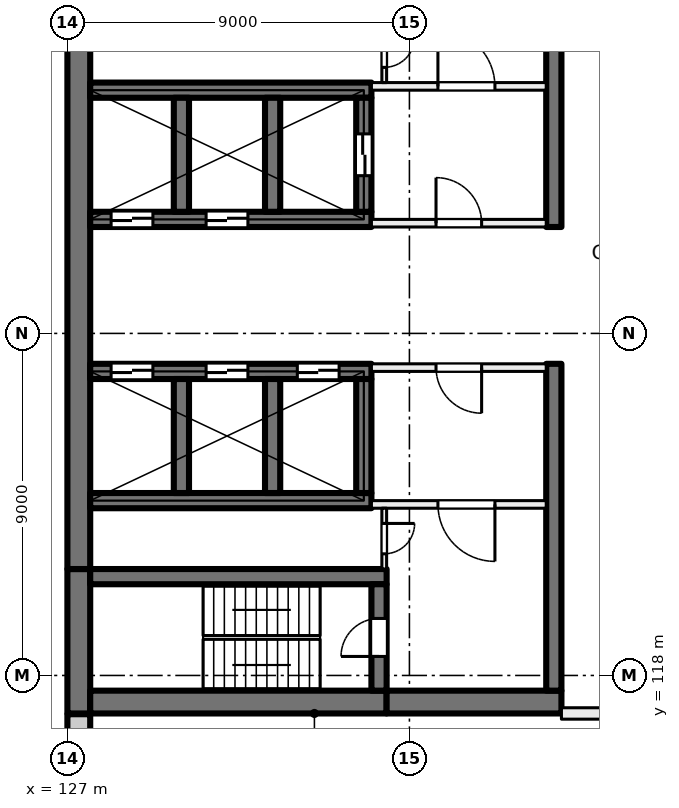
"""IFC4 building model, lengths in metres.
Left out: names, types, materials, properties, quantities, classifications, styles, units other than length and angle.
Written with IfcOpenShell. Run it as: python <this file> out.ifc"""

import sys

from ifc_helpers import new_model, si_unit, direction, frame, frame_2d, origin, place, context, subcontext, project, spatial, rectangle, extrude, element, fill, save


model = new_model("IFC4")
c1 = context("Model", 3, precision=1e-05, world=origin(), true_north=direction((0.0, 1.0)))
c2 = subcontext(c1, "Body", "Model", "MODEL_VIEW")
j1 = project(units=[si_unit("LENGTHUNIT", "METRE"), si_unit("PLANEANGLEUNIT", "RADIAN")], contexts=[c1])
p1 = place(None, origin())
s1 = spatial("IfcSite", under=j1, at=p1, CompositionType="ELEMENT")
p2 = place(p1, origin())
s2 = spatial("IfcBuilding", under=s1, at=p2, CompositionType="ELEMENT")
p3 = place(p2, frame((0.0, 0.0, 105.0)))
s3 = spatial("IfcBuildingStorey", under=s2, at=p3, CompositionType="ELEMENT", Elevation=105.0)
p4 = place(p3, frame((127.3, 117.0, 0.0), z_axis=(0.0, 0.0, 1.0), x_axis=(0.0, 1.0, 0.0)))
e1 = element("IfcWall", 1, at=p4, inside=s3, PredefinedType="SHEAR", context=c2, shape_type="SweptSolid", body=[
    extrude(rectangle(XDim=3.8, YDim=0.6, at=frame_2d((1.9, 0.0))), origin(), (0.0, 0.0, 1.0), 4.0),
])
p5 = place(p3, frame((127.3, 120.8, 0.0), z_axis=(0.0, 0.0, 1.0), x_axis=(0.0, 1.0, 0.0)))
e2 = element("IfcWall", 2, at=p5, inside=s3, PredefinedType="SHEAR", context=c2, shape_type="SweptSolid", body=[
    extrude(rectangle(XDim=14.4, YDim=0.6, at=frame_2d((7.2, 0.0))), origin(), (0.0, 0.0, 1.0), 4.0),
])
p6 = place(p3, frame((127.6, 117.3, 0.0), z_axis=(0.0, 0.0, 1.0), x_axis=(1.0, 0.0, 0.0)))
e3 = element("IfcWall", 3, at=p6, inside=s3, PredefinedType="SHEAR", context=c2, shape_type="SweptSolid", body=[
    extrude(rectangle(XDim=7.8, YDim=0.6, at=frame_2d((3.9, 0.0))), origin(), (0.0, 0.0, 1.0), 4.0),
])
p7 = place(p3, frame((135.4, 117.3, 0.0), z_axis=(0.0, 0.0, 1.0), x_axis=(1.0, 0.0, 0.0)))
e4 = element("IfcWall", 4, at=p7, inside=s3, PredefinedType="SHEAR", context=c2, shape_type="SweptSolid", body=[
    extrude(rectangle(XDim=4.6, YDim=0.6, at=frame_2d((2.3, 0.0))), origin(), (0.0, 0.0, 1.0), 4.0),
])
p8 = place(p3, frame((127.6, 120.6, 0.0), z_axis=(0.0, 0.0, 1.0), x_axis=(1.0, 0.0, 0.0)))
e5 = element("IfcWall", 5, at=p8, inside=s3, PredefinedType="SHEAR", context=c2, shape_type="SweptSolid", body=[
    extrude(rectangle(XDim=7.8, YDim=0.4, at=frame_2d((3.9, 0.0))), origin(), (0.0, 0.0, 1.0), 4.0),
])
p9 = place(p3, frame((135.2, 117.6, 0.0), z_axis=(0.0, 0.0, 1.0), x_axis=(0.0, 1.0, 0.0)))
e6 = element("IfcWall", 6, at=p9, inside=s3, PredefinedType="SHEAR", context=c2, shape_type="SweptSolid", body=[
    extrude(rectangle(XDim=2.8, YDim=0.4, at=frame_2d((1.4, 0.0))), origin(), (0.0, 0.0, 1.0), 4.0),
])
p10 = place(p9, frame((0.9, 0.0, 0.0)))
e7 = element("IfcOpeningElement", 7, at=p10, cuts=e6, PredefinedType="OPENING", context=c2, shape_type="SweptSolid", body=[
    extrude(rectangle(XDim=1.0, YDim=2.1, at=frame_2d((0.5, 1.05))), frame((0.0, 0.21, 0.0), z_axis=(0.0, -1.0, 0.0), x_axis=(1.0, 0.0, 0.0)), (0.0, 0.0, 1.0), 0.42),
])
p11 = place(p3, frame((127.6, 126.0, 0.0), z_axis=(0.0, 0.0, 1.0), x_axis=(1.0, 0.0, 0.0)))
e8 = element("IfcWall", 8, at=p11, inside=s3, PredefinedType="SHEAR", context=c2, shape_type="SweptSolid", body=[
    extrude(rectangle(XDim=7.4, YDim=0.4, at=frame_2d((3.7, 0.0))), origin(), (0.0, 0.0, 1.0), 4.0),
])
p12 = place(p11, frame((0.55, 0.0, 0.0)))
e9 = element("IfcOpeningElement", 9, at=p12, cuts=e8, PredefinedType="OPENING", context=c2, shape_type="SweptSolid", body=[
    extrude(rectangle(XDim=1.1, YDim=2.1, at=frame_2d((0.55, 1.05))), frame((0.0, 0.21, 0.0), z_axis=(0.0, -1.0, 0.0), x_axis=(1.0, 0.0, 0.0)), (0.0, 0.0, 1.0), 0.42),
])
p13 = place(p11, frame((3.05, 0.0, 0.0)))
e10 = element("IfcOpeningElement", 10, at=p13, cuts=e8, PredefinedType="OPENING", context=c2, shape_type="SweptSolid", body=[
    extrude(rectangle(XDim=1.1, YDim=2.1, at=frame_2d((0.55, 1.05))), frame((0.0, 0.21, 0.0), z_axis=(0.0, -1.0, 0.0), x_axis=(1.0, 0.0, 0.0)), (0.0, 0.0, 1.0), 0.42),
])
p14 = place(p11, frame((5.45, 0.0, 0.0)))
e11 = element("IfcOpeningElement", 11, at=p14, cuts=e8, PredefinedType="OPENING", context=c2, shape_type="SweptSolid", body=[
    extrude(rectangle(XDim=1.1, YDim=2.1, at=frame_2d((0.55, 1.05))), frame((0.0, 0.21, 0.0), z_axis=(0.0, -1.0, 0.0), x_axis=(1.0, 0.0, 0.0)), (0.0, 0.0, 1.0), 0.42),
])
p15 = place(p3, frame((127.6, 122.6, 0.0), z_axis=(0.0, 0.0, 1.0), x_axis=(1.0, 0.0, 0.0)))
e12 = element("IfcWall", 12, at=p15, inside=s3, PredefinedType="SHEAR", context=c2, shape_type="SweptSolid", body=[
    extrude(rectangle(XDim=7.4, YDim=0.4, at=frame_2d((3.7, 0.0))), origin(), (0.0, 0.0, 1.0), 4.0),
])
for number, where, z_axis, x_axis in (
    (13, (130.0, 122.8, 0.0), (0.0, 0.0, 1.0), (0.0, 1.0, 0.0)),
    (14, (132.4, 122.8, 0.0), (0.0, 0.0, 1.0), (0.0, 1.0, 0.0)),
    (15, (134.8, 122.8, 0.0), (0.0, 0.0, 1.0), (0.0, 1.0, 0.0)),
):
    element("IfcWall", number, at=place(p3, frame(where, z_axis=z_axis, x_axis=x_axis)), inside=s3, PredefinedType="SHEAR", context=c2, shape_type="SweptSolid", body=[
        extrude(rectangle(XDim=3.0, YDim=0.4, at=frame_2d((1.5, 0.0))), origin(), (0.0, 0.0, 1.0), 4.0),
    ])
p16 = place(p3, frame((127.6, 130.0, 0.0), z_axis=(0.0, 0.0, 1.0), x_axis=(1.0, 0.0, 0.0)))
e16 = element("IfcWall", 16, at=p16, inside=s3, PredefinedType="SHEAR", context=c2, shape_type="SweptSolid", body=[
    extrude(rectangle(XDim=7.4, YDim=0.4, at=frame_2d((3.7, 0.0))), origin(), (0.0, 0.0, 1.0), 4.0),
])
p17 = place(p16, frame((0.55, 0.0, 0.0)))
e17 = element("IfcOpeningElement", 17, at=p17, cuts=e16, PredefinedType="OPENING", context=c2, shape_type="SweptSolid", body=[
    extrude(rectangle(XDim=1.1, YDim=2.1, at=frame_2d((0.55, 1.05))), frame((0.0, 0.21, 0.0), z_axis=(0.0, -1.0, 0.0), x_axis=(1.0, 0.0, 0.0)), (0.0, 0.0, 1.0), 0.42),
])
p18 = place(p16, frame((3.05, 0.0, 0.0)))
e18 = element("IfcOpeningElement", 18, at=p18, cuts=e16, PredefinedType="OPENING", context=c2, shape_type="SweptSolid", body=[
    extrude(rectangle(XDim=1.1, YDim=2.1, at=frame_2d((0.55, 1.05))), frame((0.0, 0.21, 0.0), z_axis=(0.0, -1.0, 0.0), x_axis=(1.0, 0.0, 0.0)), (0.0, 0.0, 1.0), 0.42),
])
p19 = place(p3, frame((127.6, 133.4, 0.0), z_axis=(0.0, 0.0, 1.0), x_axis=(1.0, 0.0, 0.0)))
e19 = element("IfcWall", 19, at=p19, inside=s3, PredefinedType="SHEAR", context=c2, shape_type="SweptSolid", body=[
    extrude(rectangle(XDim=7.4, YDim=0.4, at=frame_2d((3.7, 0.0))), origin(), (0.0, 0.0, 1.0), 4.0),
])
for number, where, z_axis, x_axis in (
    (20, (130.0, 130.2, 0.0), (0.0, 0.0, 1.0), (0.0, 1.0, 0.0)),
    (21, (132.4, 130.2, 0.0), (0.0, 0.0, 1.0), (0.0, 1.0, 0.0)),
):
    element("IfcWall", number, at=place(p3, frame(where, z_axis=z_axis, x_axis=x_axis)), inside=s3, PredefinedType="SHEAR", context=c2, shape_type="SweptSolid", body=[
        extrude(rectangle(XDim=3.0, YDim=0.4, at=frame_2d((1.5, 0.0))), origin(), (0.0, 0.0, 1.0), 4.0),
    ])
p20 = place(p3, frame((134.8, 130.2, 0.0), z_axis=(0.0, 0.0, 1.0), x_axis=(0.0, 1.0, 0.0)))
e22 = element("IfcWall", 22, at=p20, inside=s3, PredefinedType="SHEAR", context=c2, shape_type="SweptSolid", body=[
    extrude(rectangle(XDim=3.0, YDim=0.4, at=frame_2d((1.5, 0.0))), origin(), (0.0, 0.0, 1.0), 4.0),
])
p21 = place(p20, frame((0.95, 0.0, 0.0)))
e23 = element("IfcOpeningElement", 23, at=p21, cuts=e22, PredefinedType="OPENING", context=c2, shape_type="SweptSolid", body=[
    extrude(rectangle(XDim=1.1, YDim=2.1, at=frame_2d((0.55, 1.05))), frame((0.0, 0.21, 0.0), z_axis=(0.0, -1.0, 0.0), x_axis=(1.0, 0.0, 0.0)), (0.0, 0.0, 1.0), 0.42),
])
for number, where, z_axis, x_axis in (
    (24, (139.8, 117.6, 0.0), (0.0, 0.0, 1.0), (0.0, 1.0, 0.0)),
    (25, (139.8, 129.8, 0.0), (0.0, 0.0, 1.0), (0.0, 1.0, 0.0)),
):
    element("IfcWall", number, at=place(p3, frame(where, z_axis=z_axis, x_axis=x_axis)), inside=s3, PredefinedType="SHEAR", context=c2, shape_type="SweptSolid", body=[
        extrude(rectangle(XDim=8.6, YDim=0.4, at=frame_2d((4.3, 0.0))), origin(), (0.0, 0.0, 1.0), 4.0),
    ])
p22 = place(p3, frame((127.3, 114.07, 0.0), z_axis=(0.0, 0.0, 1.0), x_axis=(0.0, 1.0, 0.0)))
e26 = element("IfcWall", 26, at=p22, inside=s3, PredefinedType="SOLIDWALL", context=c2, shape_type="SweptSolid", body=[
    extrude(rectangle(XDim=2.91, YDim=0.6, at=frame_2d((1.455, 0.0))), origin(), (0.0, 0.0, 1.0), 3.625),
])
p23 = place(p3, frame((135.0, 129.9, 0.0), z_axis=(0.0, 0.0, 1.0), x_axis=(1.0, 0.0, 0.0)))
e27 = element("IfcWall", 27, at=p23, inside=s3, PredefinedType="PARTITIONING", context=c2, shape_type="SweptSolid", body=[
    extrude(rectangle(XDim=4.6, YDim=0.2, at=frame_2d((2.3, 0.0))), origin(), (0.0, 0.0, 1.0), 3.625),
])
p24 = place(p23, frame((1.7, 0.0, 0.0)))
e28 = element("IfcOpeningElement", 28, at=p24, cuts=e27, PredefinedType="OPENING", context=c2, shape_type="SweptSolid", body=[
    extrude(rectangle(XDim=1.2, YDim=2.1, at=frame_2d((0.6, 1.05))), frame((0.0, 0.11, 0.0), z_axis=(0.0, -1.0, 0.0), x_axis=(1.0, 0.0, 0.0)), (0.0, 0.0, 1.0), 0.22),
])
p25 = place(p3, frame((135.0, 133.5, 0.0), z_axis=(0.0, 0.0, 1.0), x_axis=(1.0, 0.0, 0.0)))
e29 = element("IfcWall", 29, at=p25, inside=s3, PredefinedType="PARTITIONING", context=c2, shape_type="SweptSolid", body=[
    extrude(rectangle(XDim=4.6, YDim=0.2, at=frame_2d((2.3, 0.0))), origin(), (0.0, 0.0, 1.0), 3.625),
])
p26 = place(p25, frame((1.75, 0.0, 0.0)))
e30 = element("IfcOpeningElement", 30, at=p26, cuts=e29, PredefinedType="OPENING", context=c2, shape_type="SweptSolid", body=[
    extrude(rectangle(XDim=1.5, YDim=2.1, at=frame_2d((0.75, 1.05))), frame((0.0, 0.11, 0.0), z_axis=(0.0, -1.0, 0.0), x_axis=(1.0, 0.0, 0.0)), (0.0, 0.0, 1.0), 0.22),
])
p27 = place(p3, frame((135.337, 135.2, 0.0), z_axis=(0.0, 0.0, 1.0), x_axis=(0.0, -1.0, 0.0)))
e31 = element("IfcWall", 31, at=p27, inside=s3, PredefinedType="PARTITIONING", context=c2, shape_type="SweptSolid", body=[
    extrude(rectangle(XDim=1.6, YDim=0.125, at=frame_2d((0.8, 0.0))), origin(), (0.0, 0.0, 1.0), 3.625),
])
p28 = place(p27, frame((0.4, 0.0, 0.0)))
e32 = element("IfcOpeningElement", 32, at=p28, cuts=e31, PredefinedType="OPENING", context=c2, shape_type="SweptSolid", body=[
    extrude(rectangle(XDim=0.8, YDim=2.1, at=frame_2d((0.4, 1.05))), frame((0.0, 0.073, 0.0), z_axis=(0.0, -1.0, 0.0), x_axis=(1.0, 0.0, 0.0)), (0.0, 0.0, 1.0), 0.145),
])
p29 = place(p3, frame((139.6, 126.1, 0.0), z_axis=(0.0, 0.0, 1.0), x_axis=(-1.0, 0.0, 0.0)))
e33 = element("IfcWall", 33, at=p29, inside=s3, PredefinedType="PARTITIONING", context=c2, shape_type="SweptSolid", body=[
    extrude(rectangle(XDim=4.6, YDim=0.2, at=frame_2d((2.3, 0.0))), origin(), (0.0, 0.0, 1.0), 3.625),
])
p30 = place(p29, frame((1.7, 0.0, 0.0)))
e34 = element("IfcOpeningElement", 34, at=p30, cuts=e33, PredefinedType="OPENING", context=c2, shape_type="SweptSolid", body=[
    extrude(rectangle(XDim=1.2, YDim=2.1, at=frame_2d((0.6, 1.05))), frame((0.0, 0.11, 0.0), z_axis=(0.0, -1.0, 0.0), x_axis=(1.0, 0.0, 0.0)), (0.0, 0.0, 1.0), 0.22),
])
p31 = place(p3, frame((139.6, 122.5, 0.0), z_axis=(0.0, 0.0, 1.0), x_axis=(-1.0, 0.0, 0.0)))
e35 = element("IfcWall", 35, at=p31, inside=s3, PredefinedType="PARTITIONING", context=c2, shape_type="SweptSolid", body=[
    extrude(rectangle(XDim=4.6, YDim=0.2, at=frame_2d((2.3, 0.0))), origin(), (0.0, 0.0, 1.0), 3.625),
])
p32 = place(p31, frame((1.35, 0.0, 0.0)))
e36 = element("IfcOpeningElement", 36, at=p32, cuts=e35, PredefinedType="OPENING", context=c2, shape_type="SweptSolid", body=[
    extrude(rectangle(XDim=1.5, YDim=2.1, at=frame_2d((0.75, 1.05))), frame((0.0, 0.11, 0.0), z_axis=(0.0, -1.0, 0.0), x_axis=(1.0, 0.0, 0.0)), (0.0, 0.0, 1.0), 0.22),
])
p33 = place(p3, frame((135.337, 122.4, 0.0), z_axis=(0.0, 0.0, 1.0), x_axis=(0.0, -1.0, 0.0)))
e37 = element("IfcWall", 37, at=p33, inside=s3, PredefinedType="PARTITIONING", context=c2, shape_type="SweptSolid", body=[
    extrude(rectangle(XDim=1.6, YDim=0.125, at=frame_2d((0.8, 0.0))), origin(), (0.0, 0.0, 1.0), 3.625),
])
p34 = place(p33, frame((0.4, 0.0, 0.0)))
e38 = element("IfcOpeningElement", 38, at=p34, cuts=e37, PredefinedType="OPENING", context=c2, shape_type="SweptSolid", body=[
    extrude(rectangle(XDim=0.8, YDim=2.1, at=frame_2d((0.4, 1.05))), frame((0.0, 0.073, 0.0), z_axis=(0.0, -1.0, 0.0), x_axis=(1.0, 0.0, 0.0)), (0.0, 0.0, 1.0), 0.145),
])
p35 = place(p3, frame((144.35, 117.0, 0.0), z_axis=(0.0, 0.0, 1.0), x_axis=(-1.0, 0.0, 0.0)))
e39 = element("IfcWall", 39, at=p35, inside=s3, PredefinedType="PARTITIONING", context=c2, shape_type="SweptSolid", body=[
    extrude(rectangle(XDim=4.35, YDim=0.3, at=frame_2d((2.175, 0.0))), origin(), (0.0, 0.0, 1.0), 3.625),
])
p36 = place(p35, frame((1.267, 0.0, 0.0)))
e40 = element("IfcOpeningElement", 40, at=p36, cuts=e39, PredefinedType="OPENING", context=c2, shape_type="SweptSolid", body=[
    extrude(rectangle(XDim=1.8, YDim=2.1, at=frame_2d((0.9, 1.05))), frame((0.0, 0.16, 0.0), z_axis=(0.0, -1.0, 0.0), x_axis=(1.0, 0.0, 0.0)), (0.0, 0.0, 1.0), 0.32),
])
p37 = place(p17, origin())
e41 = element("IfcDoor", 41, at=p37, inside=s3, OperationType="DOUBLE_DOOR_SLIDING", PredefinedType="DOOR", context=c2, shape_type="SweptSolid", body=[
    extrude(rectangle(XDim=1.1, YDim=2.1, at=frame_2d((0.55, 1.05))), frame((0.0, 0.025, 0.0), z_axis=(0.0, -1.0, 0.0), x_axis=(1.0, 0.0, 0.0)), (0.0, 0.0, 1.0), 0.05),
])
fill(e17, e41)
p38 = place(p18, origin())
e42 = element("IfcDoor", 42, at=p38, inside=s3, OperationType="DOUBLE_DOOR_SLIDING", PredefinedType="DOOR", context=c2, shape_type="SweptSolid", body=[
    extrude(rectangle(XDim=1.1, YDim=2.1, at=frame_2d((0.55, 1.05))), frame((0.0, 0.025, 0.0), z_axis=(0.0, -1.0, 0.0), x_axis=(1.0, 0.0, 0.0)), (0.0, 0.0, 1.0), 0.05),
])
fill(e18, e42)
p39 = place(p12, origin())
e43 = element("IfcDoor", 43, at=p39, inside=s3, OperationType="DOUBLE_DOOR_SLIDING", PredefinedType="DOOR", context=c2, shape_type="SweptSolid", body=[
    extrude(rectangle(XDim=1.1, YDim=2.1, at=frame_2d((0.55, 1.05))), frame((0.0, 0.025, 0.0), z_axis=(0.0, -1.0, 0.0), x_axis=(1.0, 0.0, 0.0)), (0.0, 0.0, 1.0), 0.05),
])
fill(e9, e43)
p40 = place(p13, origin())
e44 = element("IfcDoor", 44, at=p40, inside=s3, OperationType="DOUBLE_DOOR_SLIDING", PredefinedType="DOOR", context=c2, shape_type="SweptSolid", body=[
    extrude(rectangle(XDim=1.1, YDim=2.1, at=frame_2d((0.55, 1.05))), frame((0.0, 0.025, 0.0), z_axis=(0.0, -1.0, 0.0), x_axis=(1.0, 0.0, 0.0)), (0.0, 0.0, 1.0), 0.05),
])
fill(e10, e44)
p41 = place(p14, origin())
e45 = element("IfcDoor", 45, at=p41, inside=s3, OperationType="DOUBLE_DOOR_SLIDING", PredefinedType="DOOR", context=c2, shape_type="SweptSolid", body=[
    extrude(rectangle(XDim=1.1, YDim=2.1, at=frame_2d((0.55, 1.05))), frame((0.0, 0.025, 0.0), z_axis=(0.0, -1.0, 0.0), x_axis=(1.0, 0.0, 0.0)), (0.0, 0.0, 1.0), 0.05),
])
fill(e11, e45)
p42 = place(p24, origin())
e46 = element("IfcDoor", 46, at=p42, inside=s3, OperationType="DOUBLE_DOOR_SINGLE_SWING", PredefinedType="DOOR", context=c2, shape_type="SweptSolid", body=[
    extrude(rectangle(XDim=1.2, YDim=2.1, at=frame_2d((0.6, 1.05))), frame((0.0, 0.025, 0.0), z_axis=(0.0, -1.0, 0.0), x_axis=(1.0, 0.0, 0.0)), (0.0, 0.0, 1.0), 0.05),
])
fill(e28, e46)
p43 = place(p26, origin())
e47 = element("IfcDoor", 47, at=p43, inside=s3, OperationType="DOUBLE_DOOR_SINGLE_SWING", PredefinedType="DOOR", context=c2, shape_type="SweptSolid", body=[
    extrude(rectangle(XDim=1.5, YDim=2.1, at=frame_2d((0.75, 1.05))), frame((0.0, 0.025, 0.0), z_axis=(0.0, -1.0, 0.0), x_axis=(1.0, 0.0, 0.0)), (0.0, 0.0, 1.0), 0.05),
])
fill(e30, e47)
p44 = place(p28, origin())
e48 = element("IfcDoor", 48, at=p44, inside=s3, OperationType="SINGLE_SWING_RIGHT", PredefinedType="DOOR", context=c2, shape_type="SweptSolid", body=[
    extrude(rectangle(XDim=0.8, YDim=2.1, at=frame_2d((0.4, 1.05))), frame((0.0, 0.025, 0.0), z_axis=(0.0, -1.0, 0.0), x_axis=(1.0, 0.0, 0.0)), (0.0, 0.0, 1.0), 0.05),
])
fill(e32, e48)
p45 = place(p30, origin())
e49 = element("IfcDoor", 49, at=p45, inside=s3, OperationType="DOUBLE_DOOR_SINGLE_SWING", PredefinedType="DOOR", context=c2, shape_type="SweptSolid", body=[
    extrude(rectangle(XDim=1.2, YDim=2.1, at=frame_2d((0.6, 1.05))), frame((0.0, 0.025, 0.0), z_axis=(0.0, -1.0, 0.0), x_axis=(1.0, 0.0, 0.0)), (0.0, 0.0, 1.0), 0.05),
])
fill(e34, e49)
p46 = place(p32, origin())
e50 = element("IfcDoor", 50, at=p46, inside=s3, OperationType="DOUBLE_DOOR_SINGLE_SWING", PredefinedType="DOOR", context=c2, shape_type="SweptSolid", body=[
    extrude(rectangle(XDim=1.5, YDim=2.1, at=frame_2d((0.75, 1.05))), frame((0.0, 0.025, 0.0), z_axis=(0.0, -1.0, 0.0), x_axis=(1.0, 0.0, 0.0)), (0.0, 0.0, 1.0), 0.05),
])
fill(e36, e50)
p47 = place(p10, origin())
e51 = element("IfcDoor", 51, at=p47, inside=s3, OperationType="SINGLE_SWING_RIGHT", PredefinedType="DOOR", context=c2, shape_type="SweptSolid", body=[
    extrude(rectangle(XDim=1.0, YDim=2.1, at=frame_2d((0.5, 1.05))), frame((0.0, 0.025, 0.0), z_axis=(0.0, -1.0, 0.0), x_axis=(1.0, 0.0, 0.0)), (0.0, 0.0, 1.0), 0.05),
])
fill(e7, e51)
p48 = place(p34, origin())
e52 = element("IfcDoor", 52, at=p48, inside=s3, OperationType="SINGLE_SWING_LEFT", PredefinedType="DOOR", context=c2, shape_type="SweptSolid", body=[
    extrude(rectangle(XDim=0.8, YDim=2.1, at=frame_2d((0.4, 1.05))), frame((0.0, 0.025, 0.0), z_axis=(0.0, -1.0, 0.0), x_axis=(1.0, 0.0, 0.0)), (0.0, 0.0, 1.0), 0.05),
])
fill(e38, e52)
p49 = place(p21, origin())
e53 = element("IfcDoor", 53, at=p49, inside=s3, OperationType="DOUBLE_DOOR_SLIDING", PredefinedType="DOOR", context=c2, shape_type="SweptSolid", body=[
    extrude(rectangle(XDim=1.1, YDim=2.1, at=frame_2d((0.55, 1.05))), frame((0.0, 0.025, 0.0), z_axis=(0.0, -1.0, 0.0), x_axis=(1.0, 0.0, 0.0)), (0.0, 0.0, 1.0), 0.05),
])
fill(e23, e53)
save(model, sys.argv[1])
